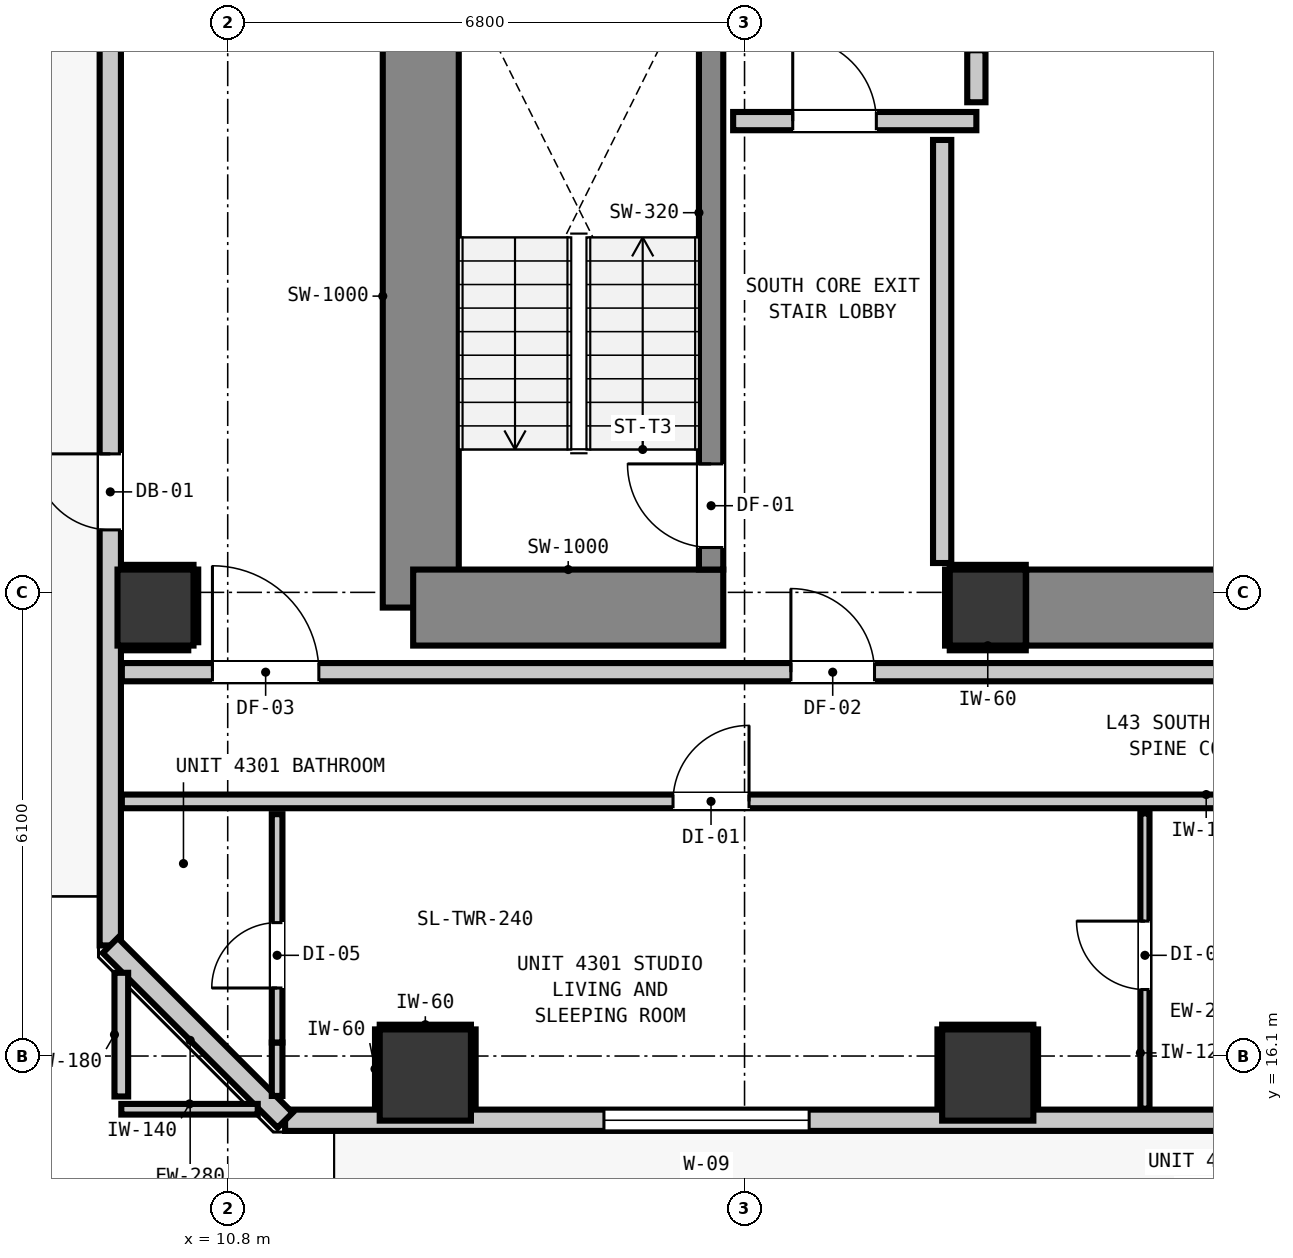
"""IFC4 building model, lengths in metres.
Left out: names, types, materials, properties, quantities, classifications, styles, units other than length and angle.
Written with IfcOpenShell. Run it as: python <this file> out.ifc"""

import sys

from ifc_helpers import new_model, si_unit, direction, frame, frame_2d, origin, origin_2d, place, context, subcontext, project, spatial, rectangle, extrude, element, fill, save


model = new_model("IFC4")
c1 = context("Model", 3, precision=1e-05, world=origin(), true_north=direction((0.0, 1.0)))
c2 = subcontext(c1, "Body", "Model", "MODEL_VIEW")
j1 = project(units=[si_unit("LENGTHUNIT", "METRE"), si_unit("PLANEANGLEUNIT", "RADIAN")], contexts=[c1])
p1 = place(None, origin())
s1 = spatial("IfcSite", under=j1, at=p1, CompositionType="ELEMENT")
p2 = place(p1, origin())
s2 = spatial("IfcBuilding", under=s1, at=p2, CompositionType="ELEMENT")
p3 = place(p2, frame((0.0, 0.0, 149.24)))
s3 = spatial("IfcBuildingStorey", under=s2, at=p3, CompositionType="ELEMENT", Elevation=149.24)
p4 = place(p3, frame((20.8, 22.0, 0.0), z_axis=(0.0, 0.0, 1.0), x_axis=(1.0, 0.0, 0.0)))
e1 = element("IfcColumn", 1, at=p4, inside=s3, PredefinedType="COLUMN", context=c2, shape_type="SweptSolid", body=[
    extrude(rectangle(XDim=1.0, YDim=1.0, at=origin_2d()), origin(), (0.0, 0.0, 1.0), 3.32),
])
p5 = place(p3, frame((13.34, 22.0, 0.0), z_axis=(0.0, 0.0, 1.0), x_axis=(0.0, 1.0, 0.0)))
e2 = element("IfcWall", 2, at=p5, inside=s3, PredefinedType="SHEAR", context=c2, shape_type="SweptSolid", body=[
    extrude(rectangle(XDim=8.195, YDim=1.0, at=frame_2d((4.098, 0.0))), origin(), (0.0, 0.0, 1.0), 3.32),
])
p6 = place(p3, frame((13.24, 22.0, 0.0), z_axis=(0.0, 0.0, 1.0), x_axis=(1.0, 0.0, 0.0)))
e3 = element("IfcWall", 3, at=p6, inside=s3, PredefinedType="SHEAR", context=c2, shape_type="SweptSolid", body=[
    extrude(rectangle(XDim=4.08, YDim=1.0, at=frame_2d((2.04, 0.0))), origin(), (0.0, 0.0, 1.0), 3.32),
])
p7 = place(p3, frame((21.305, 22.0, 0.0), z_axis=(0.0, 0.0, 1.0), x_axis=(1.0, 0.0, 0.0)))
e4 = element("IfcWall", 4, at=p7, inside=s3, PredefinedType="SHEAR", context=c2, shape_type="SweptSolid", body=[
    extrude(rectangle(XDim=7.39, YDim=1.0, at=frame_2d((3.695, 0.0))), origin(), (0.0, 0.0, 1.0), 3.32),
])
p8 = place(p3, frame((17.16, 22.5, 0.0), z_axis=(0.0, 0.0, 1.0), x_axis=(0.0, 1.0, 0.0)))
e5 = element("IfcWall", 5, at=p8, inside=s3, PredefinedType="SHEAR", context=c2, shape_type="SweptSolid", body=[
    extrude(rectangle(XDim=7.9, YDim=0.32, at=frame_2d((3.95, 0.0))), origin(), (0.0, 0.0, 1.0), 3.32),
])
p9 = place(p8, frame((0.29, 0.0, 0.0)))
e6 = element("IfcOpeningElement", 6, at=p9, cuts=e5, PredefinedType="OPENING", context=c2, shape_type="SweptSolid", body=[
    extrude(rectangle(XDim=1.1, YDim=2.15, at=frame_2d((0.55, 1.075))), frame((0.0, 0.17, 0.0), z_axis=(0.0, -1.0, 0.0), x_axis=(1.0, 0.0, 0.0)), (0.0, 0.0, 1.0), 0.34),
])
for number, where, z_axis, x_axis in (
    (7, (13.4, 15.85, 0.0), (0.0, 0.0, 1.0), (1.0, 0.0, 0.0)),
    (8, (20.8, 15.85, 0.0), (0.0, 0.0, 1.0), (1.0, 0.0, 0.0)),
):
    element("IfcColumn", number, at=place(p3, frame(where, z_axis=z_axis, x_axis=x_axis)), inside=s3, PredefinedType="COLUMN", context=c2, shape_type="SweptSolid", body=[
        extrude(rectangle(XDim=1.2, YDim=1.2, at=origin_2d()), origin(), (0.0, 0.0, 1.0), 3.32),
    ])
p10 = place(p3, frame((9.85, 22.0, 0.0), z_axis=(0.0, 0.0, 1.0), x_axis=(1.0, 0.0, 0.0)))
e9 = element("IfcColumn", 9, at=p10, inside=s3, PredefinedType="COLUMN", context=c2, shape_type="SweptSolid", body=[
    extrude(rectangle(XDim=1.0, YDim=1.0, at=origin_2d()), origin(), (0.0, 0.0, 1.0), 3.32),
])
p11 = place(p3, frame((9.255, 17.555, 0.0), z_axis=(0.0, 0.0, 1.0), x_axis=(0.0, 1.0, 0.0)))
e10 = element("IfcWall", 10, at=p11, inside=s3, PredefinedType="STANDARD", context=c2, shape_type="SweptSolid", body=[
    extrude(rectangle(XDim=32.29, YDim=0.28, at=frame_2d((16.145, 0.0))), origin(), (0.0, 0.0, 1.0), 3.08),
])
p12 = place(p11, frame((5.467, 0.0, 0.0)))
e11 = element("IfcOpeningElement", 11, at=p12, cuts=e10, PredefinedType="OPENING", context=c2, shape_type="SweptSolid", body=[
    extrude(rectangle(XDim=1.0, YDim=2.15, at=frame_2d((0.5, 1.075))), frame((0.0, 0.15, 0.0), z_axis=(0.0, -1.0, 0.0), x_axis=(1.0, 0.0, 0.0)), (0.0, 0.0, 1.0), 0.3),
])
p13 = place(p11, frame((30.753, 0.0, 0.85)))
e12 = element("IfcOpeningElement", 12, at=p13, cuts=e10, PredefinedType="OPENING", context=c2, shape_type="SweptSolid", body=[
    extrude(rectangle(XDim=1.05, YDim=1.65, at=frame_2d((0.525, 0.825))), frame((0.0, 0.15, 0.0), z_axis=(0.0, -1.0, 0.0), x_axis=(1.0, 0.0, 0.0)), (0.0, 0.0, 1.0), 0.3),
])
p14 = place(p3, frame((46.645, 15.255, 0.0), z_axis=(0.0, 0.0, 1.0), x_axis=(-1.0, 0.0, 0.0)))
e13 = element("IfcWall", 13, at=p14, inside=s3, PredefinedType="STANDARD", context=c2, shape_type="SweptSolid", body=[
    extrude(rectangle(XDim=35.09, YDim=0.28, at=frame_2d((17.545, 0.0))), origin(), (0.0, 0.0, 1.0), 3.08),
])
p15 = place(p14, frame((0.904, 0.0, 0.0)))
e14 = element("IfcOpeningElement", 14, at=p15, cuts=e13, PredefinedType="OPENING", context=c2, shape_type="SweptSolid", body=[
    extrude(rectangle(XDim=1.0, YDim=2.15, at=frame_2d((0.5, 1.075))), frame((0.0, 0.15, 0.0), z_axis=(0.0, -1.0, 0.0), x_axis=(1.0, 0.0, 0.0)), (0.0, 0.0, 1.0), 0.3),
])
p16 = place(p14, frame((28.195, 0.0, 0.85)))
e15 = element("IfcOpeningElement", 15, at=p16, cuts=e13, PredefinedType="OPENING", context=c2, shape_type="SweptSolid", body=[
    extrude(rectangle(XDim=2.7, YDim=2.0, at=frame_2d((1.35, 1.0))), frame((0.0, 0.15, 0.0), z_axis=(0.0, -1.0, 0.0), x_axis=(1.0, 0.0, 0.0)), (0.0, 0.0, 1.0), 0.3),
])
p17 = place(p14, frame((14.935, 0.0, 0.85)))
e16 = element("IfcOpeningElement", 16, at=p17, cuts=e13, PredefinedType="OPENING", context=c2, shape_type="SweptSolid", body=[
    extrude(rectangle(XDim=1.05, YDim=1.65, at=frame_2d((0.525, 0.825))), frame((0.0, 0.15, 0.0), z_axis=(0.0, -1.0, 0.0), x_axis=(1.0, 0.0, 0.0)), (0.0, 0.0, 1.0), 0.3),
])
p18 = place(p14, frame((3.934, 0.0, 0.85)))
e17 = element("IfcOpeningElement", 17, at=p18, cuts=e13, PredefinedType="OPENING", context=c2, shape_type="SweptSolid", body=[
    extrude(rectangle(XDim=2.7, YDim=2.0, at=frame_2d((1.35, 1.0))), frame((0.0, 0.15, 0.0), z_axis=(0.0, -1.0, 0.0), x_axis=(1.0, 0.0, 0.0)), (0.0, 0.0, 1.0), 0.3),
])
p19 = place(p3, frame((11.555, 15.255, 0.0), z_axis=(0.0, 0.0, 1.0), x_axis=(-0.707106781187, 0.707106781187, 0.0)))
e18 = element("IfcWall", 18, at=p19, inside=s3, PredefinedType="STANDARD", context=c2, shape_type="SweptSolid", body=[
    extrude(rectangle(XDim=3.253, YDim=0.28, at=frame_2d((1.626, 0.0))), origin(), (0.0, 0.0, 1.0), 3.08),
])
p20 = place(p3, frame((9.407, 21.15, 0.0), z_axis=(0.0, 0.0, 1.0), x_axis=(1.0, 0.0, 0.0)))
e19 = element("IfcWall", 19, at=p20, inside=s3, PredefinedType="PARTITIONING", context=c2, shape_type="SweptSolid", body=[
    extrude(rectangle(XDim=27.532, YDim=0.24, at=frame_2d((13.766, 0.0))), origin(), (0.0, 0.0, 1.0), 3.08),
])
p21 = place(p20, frame((8.803, 0.0, 0.0)))
e20 = element("IfcOpeningElement", 20, at=p21, cuts=e19, PredefinedType="OPENING", context=c2, shape_type="SweptSolid", body=[
    extrude(rectangle(XDim=1.1, YDim=2.15, at=frame_2d((0.55, 1.075))), frame((0.0, 0.13, 0.0), z_axis=(0.0, -1.0, 0.0), x_axis=(1.0, 0.0, 0.0)), (0.0, 0.0, 1.0), 0.26),
])
p22 = place(p20, frame((1.192, 0.0, 0.0)))
e21 = element("IfcOpeningElement", 21, at=p22, cuts=e19, PredefinedType="OPENING", context=c2, shape_type="SweptSolid", body=[
    extrude(rectangle(XDim=1.4, YDim=2.15, at=frame_2d((0.7, 1.075))), frame((0.0, 0.13, 0.0), z_axis=(0.0, -1.0, 0.0), x_axis=(1.0, 0.0, 0.0)), (0.0, 0.0, 1.0), 0.26),
])
p23 = place(p3, frame((17.45, 28.4, 0.0), z_axis=(0.0, 0.0, 1.0), x_axis=(1.0, 0.0, 0.0)))
e22 = element("IfcWall", 22, at=p23, inside=s3, PredefinedType="PARTITIONING", context=c2, shape_type="SweptSolid", body=[
    extrude(rectangle(XDim=3.2, YDim=0.24, at=frame_2d((1.6, 0.0))), origin(), (0.0, 0.0, 1.0), 3.08),
])
p24 = place(p23, frame((0.784, 0.0, 0.0)))
e23 = element("IfcOpeningElement", 23, at=p24, cuts=e22, PredefinedType="OPENING", context=c2, shape_type="SweptSolid", body=[
    extrude(rectangle(XDim=1.1, YDim=2.15, at=frame_2d((0.55, 1.075))), frame((0.0, 0.13, 0.0), z_axis=(0.0, -1.0, 0.0), x_axis=(1.0, 0.0, 0.0)), (0.0, 0.0, 1.0), 0.26),
])
p25 = place(p3, frame((9.407, 19.45, 0.0), z_axis=(0.0, 0.0, 1.0), x_axis=(1.0, 0.0, 0.0)))
e24 = element("IfcWall", 24, at=p25, inside=s3, PredefinedType="PARTITIONING", context=c2, shape_type="SweptSolid", body=[
    extrude(rectangle(XDim=27.532, YDim=0.18, at=frame_2d((13.766, 0.0))), origin(), (0.0, 0.0, 1.0), 3.08),
])
p26 = place(p25, frame((7.252, 0.0, 0.0)))
e25 = element("IfcOpeningElement", 25, at=p26, cuts=e24, PredefinedType="OPENING", context=c2, shape_type="SweptSolid", body=[
    extrude(rectangle(XDim=1.0, YDim=2.15, at=frame_2d((0.5, 1.075))), frame((0.0, 0.1, 0.0), z_axis=(0.0, -1.0, 0.0), x_axis=(1.0, 0.0, 0.0)), (0.0, 0.0, 1.0), 0.2),
])
p27 = place(p25, frame((20.282, 0.0, 0.0)))
e26 = element("IfcOpeningElement", 26, at=p27, cuts=e24, PredefinedType="OPENING", context=c2, shape_type="SweptSolid", body=[
    extrude(rectangle(XDim=1.0, YDim=2.15, at=frame_2d((0.5, 1.075))), frame((0.0, 0.1, 0.0), z_axis=(0.0, -1.0, 0.0), x_axis=(1.0, 0.0, 0.0)), (0.0, 0.0, 1.0), 0.2),
])
p28 = place(p3, frame((9.4, 15.4, 0.0), z_axis=(0.0, 0.0, 1.0), x_axis=(1.0, 0.0, 0.0)))
e27 = element("IfcWall", 27, at=p28, inside=s3, PredefinedType="PARTITIONING", context=c2, shape_type="SweptSolid", body=[
    extrude(rectangle(XDim=1.795, YDim=0.14, at=frame_2d((0.897, 0.0))), origin(), (0.0, 0.0, 1.0), 3.08),
])
p29 = place(p3, frame((20.2, 22.586, 0.0), z_axis=(0.0, 0.0, 1.0), x_axis=(0.0, 1.0, 0.0)))
e28 = element("IfcWall", 28, at=p29, inside=s3, PredefinedType="PARTITIONING", context=c2, shape_type="SweptSolid", body=[
    extrude(rectangle(XDim=5.566, YDim=0.24, at=frame_2d((2.783, 0.0))), origin(), (0.0, 0.0, 1.0), 3.08),
])
p30 = place(p3, frame((20.65, 28.648, 0.0), z_axis=(0.0, 0.0, 1.0), x_axis=(0.0, 1.0, 0.0)))
e29 = element("IfcWall", 29, at=p30, inside=s3, PredefinedType="PARTITIONING", context=c2, shape_type="SweptSolid", body=[
    extrude(rectangle(XDim=0.684, YDim=0.24, at=frame_2d((0.342, 0.0))), origin(), (0.0, 0.0, 1.0), 2.315),
])
p31 = place(p3, frame((9.4, 15.568, 0.0), z_axis=(0.0, 0.0, 1.0), x_axis=(0.0, 1.0, 0.0)))
e30 = element("IfcWall", 30, at=p31, inside=s3, PredefinedType="PARTITIONING", context=c2, shape_type="SweptSolid", body=[
    extrude(rectangle(XDim=1.627, YDim=0.18, at=frame_2d((0.813, 0.0))), origin(), (0.0, 0.0, 1.0), 3.08),
])
p32 = place(p3, frame((11.45, 15.575, 0.0), z_axis=(0.0, 0.0, 1.0), x_axis=(0.0, 1.0, 0.0)))
e31 = element("IfcWall", 31, at=p32, inside=s3, PredefinedType="PARTITIONING", context=c2, shape_type="SweptSolid", body=[
    extrude(rectangle(XDim=0.703, YDim=0.14, at=frame_2d((0.352, 0.0))), origin(), (0.0, 0.0, 1.0), 3.08),
])
p33 = place(p3, frame((11.45, 16.278, 0.0), z_axis=(0.0, 0.0, 1.0), x_axis=(0.0, 1.0, 0.0)))
e32 = element("IfcWall", 32, at=p33, inside=s3, PredefinedType="PARTITIONING", context=c2, shape_type="SweptSolid", body=[
    extrude(rectangle(XDim=3.004, YDim=0.14, at=frame_2d((1.502, 0.0))), origin(), (0.0, 0.0, 1.0), 2.565),
])
p34 = place(p33, frame((0.717, 0.0, 0.0)))
e33 = element("IfcOpeningElement", 33, at=p34, cuts=e32, PredefinedType="OPENING", context=c2, shape_type="SweptSolid", body=[
    extrude(rectangle(XDim=0.86, YDim=2.02, at=frame_2d((0.43, 1.01))), frame((0.0, 0.08, 0.0), z_axis=(0.0, -1.0, 0.0), x_axis=(1.0, 0.0, 0.0)), (0.0, 0.0, 1.0), 0.16),
])
p35 = place(p3, frame((22.868, 15.407, 0.0), z_axis=(0.0, 0.0, 1.0), x_axis=(0.0, 1.0, 0.0)))
e34 = element("IfcWall", 34, at=p35, inside=s3, PredefinedType="PARTITIONING", context=c2, shape_type="SweptSolid", body=[
    extrude(rectangle(XDim=3.885, YDim=0.12, at=frame_2d((1.942, 0.0))), origin(), (0.0, 0.0, 1.0), 3.08),
])
p36 = place(p35, frame((1.568, 0.0, 0.0)))
e35 = element("IfcOpeningElement", 35, at=p36, cuts=e34, PredefinedType="OPENING", context=c2, shape_type="SweptSolid", body=[
    extrude(rectangle(XDim=0.9, YDim=2.1, at=frame_2d((0.45, 1.05))), frame((0.0, 0.07, 0.0), z_axis=(0.0, -1.0, 0.0), x_axis=(1.0, 0.0, 0.0)), (0.0, 0.0, 1.0), 0.14),
])
for number, where, z_axis, x_axis in (
    (36, (20.3, 21.468, 0.0), (0.0, 0.0, 1.0), (1.0, 0.0, 0.0)),
    (37, (20.3, 22.532, 0.0), (0.0, 0.0, 1.0), (1.0, 0.0, 0.0)),
    (38, (20.268, 21.5, 0.0), (0.0, 0.0, 1.0), (0.0, 1.0, 0.0)),
):
    element("IfcWall", number, at=place(p3, frame(where, z_axis=z_axis, x_axis=x_axis)), inside=s3, PredefinedType="PARTITIONING", context=c2, shape_type="SweptSolid", body=[
        extrude(rectangle(XDim=1.0, YDim=0.06, at=frame_2d((0.5, 0.0))), origin(), (0.0, 0.0, 1.0), 1.45),
    ])
p37 = place(p3, frame((12.8, 16.482, 0.0), z_axis=(0.0, 0.0, 1.0), x_axis=(1.0, 0.0, 0.0)))
e39 = element("IfcWall", 39, at=p37, inside=s3, PredefinedType="PARTITIONING", context=c2, shape_type="SweptSolid", body=[
    extrude(rectangle(XDim=1.2, YDim=0.06, at=frame_2d((0.6, 0.0))), origin(), (0.0, 0.0, 1.0), 1.45),
])
for number, where, z_axis, x_axis in (
    (40, (12.768, 15.41, 0.0), (0.0, 0.0, 1.0), (0.0, 1.0, 0.0)),
    (41, (14.032, 15.41, 0.0), (0.0, 0.0, 1.0), (0.0, 1.0, 0.0)),
):
    element("IfcWall", number, at=place(p3, frame(where, z_axis=z_axis, x_axis=x_axis)), inside=s3, PredefinedType="PARTITIONING", context=c2, shape_type="SweptSolid", body=[
        extrude(rectangle(XDim=1.04, YDim=0.06, at=frame_2d((0.52, 0.0))), origin(), (0.0, 0.0, 1.0), 1.45),
    ])
p38 = place(p3, frame((20.2, 16.482, 0.0), z_axis=(0.0, 0.0, 1.0), x_axis=(1.0, 0.0, 0.0)))
e42 = element("IfcWall", 42, at=p38, inside=s3, PredefinedType="PARTITIONING", context=c2, shape_type="SweptSolid", body=[
    extrude(rectangle(XDim=1.2, YDim=0.06, at=frame_2d((0.6, 0.0))), origin(), (0.0, 0.0, 1.0), 1.45),
])
for number, where, z_axis, x_axis in (
    (43, (20.168, 15.41, 0.0), (0.0, 0.0, 1.0), (0.0, 1.0, 0.0)),
    (44, (21.432, 15.41, 0.0), (0.0, 0.0, 1.0), (0.0, 1.0, 0.0)),
):
    element("IfcWall", number, at=place(p3, frame(where, z_axis=z_axis, x_axis=x_axis)), inside=s3, PredefinedType="PARTITIONING", context=c2, shape_type="SweptSolid", body=[
        extrude(rectangle(XDim=1.04, YDim=0.06, at=frame_2d((0.52, 0.0))), origin(), (0.0, 0.0, 1.0), 1.45),
    ])
p39 = place(p3, frame((9.41, 21.468, 0.0), z_axis=(0.0, 0.0, 1.0), x_axis=(1.0, 0.0, 0.0)))
e45 = element("IfcWall", 45, at=p39, inside=s3, PredefinedType="PARTITIONING", context=c2, shape_type="SweptSolid", body=[
    extrude(rectangle(XDim=0.871, YDim=0.06, at=frame_2d((0.436, 0.0))), origin(), (0.0, 0.0, 1.0), 1.45),
])
p40 = place(p3, frame((9.41, 22.532, 0.0), z_axis=(0.0, 0.0, 1.0), x_axis=(1.0, 0.0, 0.0)))
e46 = element("IfcWall", 46, at=p40, inside=s3, PredefinedType="PARTITIONING", context=c2, shape_type="SweptSolid", body=[
    extrude(rectangle(XDim=0.94, YDim=0.06, at=frame_2d((0.47, 0.0))), origin(), (0.0, 0.0, 1.0), 1.45),
])
p41 = place(p3, frame((10.382, 21.544, 0.0), z_axis=(0.0, 0.0, 1.0), x_axis=(0.0, 1.0, 0.0)))
e47 = element("IfcWall", 47, at=p41, inside=s3, PredefinedType="PARTITIONING", context=c2, shape_type="SweptSolid", body=[
    extrude(rectangle(XDim=0.956, YDim=0.06, at=frame_2d((0.478, 0.0))), origin(), (0.0, 0.0, 1.0), 1.45),
])
p42 = place(p12, origin())
e48 = element("IfcDoor", 48, at=p42, inside=s3, OperationType="SINGLE_SWING_RIGHT", PredefinedType="DOOR", context=c2, shape_type="SweptSolid", body=[
    extrude(rectangle(XDim=1.0, YDim=2.15, at=frame_2d((0.5, 1.075))), frame((0.0, 0.025, 0.0), z_axis=(0.0, -1.0, 0.0), x_axis=(1.0, 0.0, 0.0)), (0.0, 0.0, 1.0), 0.05),
])
fill(e11, e48)
p43 = place(p16, origin())
e49 = element("IfcWindow", 49, at=p43, inside=s3, PartitioningType="SINGLE_PANEL", PredefinedType="WINDOW", context=c2, shape_type="SweptSolid", body=[
    extrude(rectangle(XDim=2.7, YDim=2.0, at=frame_2d((1.35, 1.0))), frame((0.0, 0.03, 0.0), z_axis=(0.0, -1.0, 0.0), x_axis=(1.0, 0.0, 0.0)), (0.0, 0.0, 1.0), 0.06),
])
fill(e15, e49)
p44 = place(p9, origin())
e50 = element("IfcDoor", 50, at=p44, inside=s3, OperationType="SINGLE_SWING_RIGHT", PredefinedType="DOOR", context=c2, shape_type="SweptSolid", body=[
    extrude(rectangle(XDim=1.1, YDim=2.15, at=frame_2d((0.55, 1.075))), frame((0.0, 0.025, 0.0), z_axis=(0.0, -1.0, 0.0), x_axis=(1.0, 0.0, 0.0)), (0.0, 0.0, 1.0), 0.05),
])
fill(e6, e50)
p45 = place(p24, origin())
e51 = element("IfcDoor", 51, at=p45, inside=s3, OperationType="SINGLE_SWING_LEFT", PredefinedType="DOOR", context=c2, shape_type="SweptSolid", body=[
    extrude(rectangle(XDim=1.1, YDim=2.15, at=frame_2d((0.55, 1.075))), frame((0.0, 0.025, 0.0), z_axis=(0.0, -1.0, 0.0), x_axis=(1.0, 0.0, 0.0)), (0.0, 0.0, 1.0), 0.05),
])
fill(e23, e51)
p46 = place(p21, origin())
e52 = element("IfcDoor", 52, at=p46, inside=s3, OperationType="SINGLE_SWING_LEFT", PredefinedType="DOOR", context=c2, shape_type="SweptSolid", body=[
    extrude(rectangle(XDim=1.1, YDim=2.15, at=frame_2d((0.55, 1.075))), frame((0.0, 0.025, 0.0), z_axis=(0.0, -1.0, 0.0), x_axis=(1.0, 0.0, 0.0)), (0.0, 0.0, 1.0), 0.05),
])
fill(e20, e52)
p47 = place(p22, origin())
e53 = element("IfcDoor", 53, at=p47, inside=s3, OperationType="SINGLE_SWING_LEFT", PredefinedType="DOOR", context=c2, shape_type="SweptSolid", body=[
    extrude(rectangle(XDim=1.4, YDim=2.15, at=frame_2d((0.7, 1.075))), frame((0.0, 0.025, 0.0), z_axis=(0.0, -1.0, 0.0), x_axis=(1.0, 0.0, 0.0)), (0.0, 0.0, 1.0), 0.05),
])
fill(e21, e53)
p48 = place(p26, origin())
e54 = element("IfcDoor", 54, at=p48, inside=s3, OperationType="SINGLE_SWING_RIGHT", PredefinedType="DOOR", context=c2, shape_type="SweptSolid", body=[
    extrude(rectangle(XDim=1.0, YDim=2.15, at=frame_2d((0.5, 1.075))), frame((0.0, 0.025, 0.0), z_axis=(0.0, -1.0, 0.0), x_axis=(1.0, 0.0, 0.0)), (0.0, 0.0, 1.0), 0.05),
])
fill(e25, e54)
p49 = place(p34, origin())
e55 = element("IfcDoor", 55, at=p49, inside=s3, OperationType="SINGLE_SWING_LEFT", PredefinedType="DOOR", context=c2, shape_type="SweptSolid", body=[
    extrude(rectangle(XDim=0.86, YDim=2.02, at=frame_2d((0.43, 1.01))), frame((0.0, 0.025, 0.0), z_axis=(0.0, -1.0, 0.0), x_axis=(1.0, 0.0, 0.0)), (0.0, 0.0, 1.0), 0.05),
])
fill(e33, e55)
p50 = place(p36, origin())
e56 = element("IfcDoor", 56, at=p50, inside=s3, OperationType="SINGLE_SWING_RIGHT", PredefinedType="DOOR", context=c2, shape_type="SweptSolid", body=[
    extrude(rectangle(XDim=0.9, YDim=2.1, at=frame_2d((0.45, 1.05))), frame((0.0, 0.025, 0.0), z_axis=(0.0, -1.0, 0.0), x_axis=(1.0, 0.0, 0.0)), (0.0, 0.0, 1.0), 0.05),
])
fill(e35, e56)
save(model, sys.argv[1])
